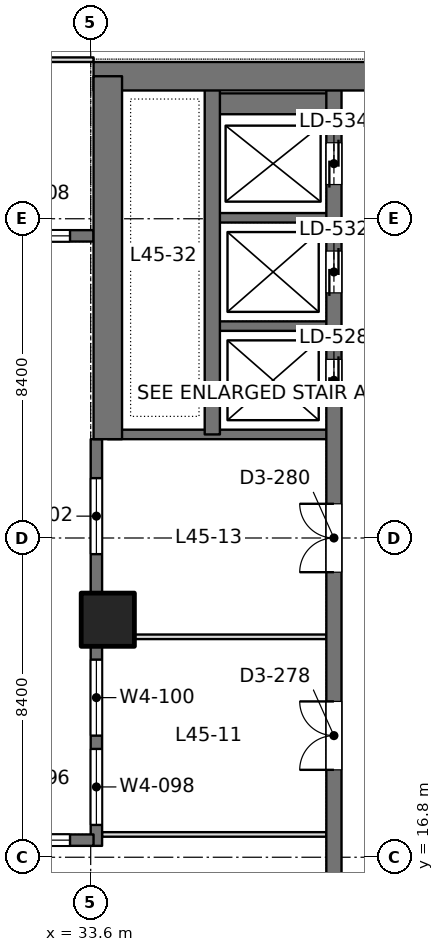
"""IFC4 building model, lengths in metres.
Left out: names, types, materials, properties, quantities, classifications, styles, units other than length and angle.
Written with IfcOpenShell. Run it as: python <this file> out.ifc"""

import sys

from ifc_helpers import new_model, si_unit, direction, frame, frame_2d, origin, origin_2d, place, context, subcontext, project, spatial, rectangle, extrude, element, fill, save


model = new_model("IFC4")
c1 = context("Model", 3, precision=1e-05, world=origin(), true_north=direction((0.0, 1.0)))
c2 = subcontext(c1, "Body", "Model", "MODEL_VIEW")
j1 = project(units=[si_unit("LENGTHUNIT", "METRE"), si_unit("PLANEANGLEUNIT", "RADIAN")], contexts=[c1])
p1 = place(None, origin())
s1 = spatial("IfcSite", under=j1, at=p1, CompositionType="ELEMENT")
p2 = place(p1, origin())
s2 = spatial("IfcBuilding", under=s1, at=p2, CompositionType="ELEMENT")
p3 = place(p2, frame((0.0, 0.0, 198.6)))
s3 = spatial("IfcBuildingStorey", under=s2, at=p3, CompositionType="ELEMENT", Elevation=198.6)
p4 = place(p3, frame((34.05, 23.05, 0.0), z_axis=(0.0, 0.0, 1.0), x_axis=(1.0, 0.0, 0.0)))
e1 = element("IfcColumn", 1, at=p4, inside=s3, PredefinedType="COLUMN", context=c2, shape_type="SweptSolid", body=[
    extrude(rectangle(XDim=1.4, YDim=1.4, at=origin_2d()), origin(), (0.0, 0.0, 1.0), 4.2),
])
p5 = place(p3, frame((33.675, 37.35, 0.0), z_axis=(0.0, 0.0, 1.0), x_axis=(1.0, 0.0, 0.0)))
e2 = element("IfcWall", 2, at=p5, inside=s3, PredefinedType="SHEAR", context=c2, shape_type="SweptSolid", body=[
    extrude(rectangle(XDim=17.85, YDim=0.75, at=frame_2d((8.925, 0.0))), origin(), (0.0, 0.0, 1.0), 4.2),
])
p6 = place(p5, frame((7.175, 0.0, 0.0)))
e3 = element("IfcOpeningElement", 3, at=p6, cuts=e2, PredefinedType="OPENING", context=c2, shape_type="SweptSolid", body=[
    extrude(rectangle(XDim=1.8, YDim=2.4, at=frame_2d((0.9, 1.2))), frame((0.0, 0.385, 0.0), z_axis=(0.0, -1.0, 0.0), x_axis=(1.0, 0.0, 0.0)), (0.0, 0.0, 1.0), 0.77),
])
p7 = place(p3, frame((34.05, 27.8, 0.0), z_axis=(0.0, 0.0, 1.0), x_axis=(0.0, 1.0, 0.0)))
e4 = element("IfcWall", 4, at=p7, inside=s3, PredefinedType="SHEAR", context=c2, shape_type="SweptSolid", body=[
    extrude(rectangle(XDim=9.55, YDim=0.75, at=frame_2d((4.775, 0.0))), origin(), (0.0, 0.0, 1.0), 4.2),
])
p8 = place(p3, frame((40.0, 13.05, 0.0), z_axis=(0.0, 0.0, 1.0), x_axis=(0.0, 1.0, 0.0)))
e5 = element("IfcWall", 5, at=p8, inside=s3, PredefinedType="SHEAR", context=c2, shape_type="SweptSolid", body=[
    extrude(rectangle(XDim=24.3, YDim=0.4, at=frame_2d((12.15, 0.0))), origin(), (0.0, 0.0, 1.0), 4.2),
])
p9 = place(p8, frame((15.75, 0.0, 0.0)))
e6 = element("IfcOpeningElement", 6, at=p9, cuts=e5, PredefinedType="OPENING", context=c2, shape_type="SweptSolid", body=[
    extrude(rectangle(XDim=1.1, YDim=2.2, at=frame_2d((0.55, 1.1))), frame((0.0, 0.21, 0.0), z_axis=(0.0, -1.0, 0.0), x_axis=(1.0, 0.0, 0.0)), (0.0, 0.0, 1.0), 0.42),
])
p10 = place(p8, frame((18.6, 0.0, 0.0)))
e7 = element("IfcOpeningElement", 7, at=p10, cuts=e5, PredefinedType="OPENING", context=c2, shape_type="SweptSolid", body=[
    extrude(rectangle(XDim=1.1, YDim=2.2, at=frame_2d((0.55, 1.1))), frame((0.0, 0.21, 0.0), z_axis=(0.0, -1.0, 0.0), x_axis=(1.0, 0.0, 0.0)), (0.0, 0.0, 1.0), 0.42),
])
p11 = place(p8, frame((21.45, 0.0, 0.0)))
e8 = element("IfcOpeningElement", 8, at=p11, cuts=e5, PredefinedType="OPENING", context=c2, shape_type="SweptSolid", body=[
    extrude(rectangle(XDim=1.1, YDim=2.2, at=frame_2d((0.55, 1.1))), frame((0.0, 0.21, 0.0), z_axis=(0.0, -1.0, 0.0), x_axis=(1.0, 0.0, 0.0)), (0.0, 0.0, 1.0), 0.42),
])
p12 = place(p8, frame((6.05, 0.0, 0.0)))
e9 = element("IfcOpeningElement", 9, at=p12, cuts=e5, PredefinedType="OPENING", context=c2, shape_type="SweptSolid", body=[
    extrude(rectangle(XDim=1.8, YDim=2.4, at=frame_2d((0.9, 1.2))), frame((0.0, 0.21, 0.0), z_axis=(0.0, -1.0, 0.0), x_axis=(1.0, 0.0, 0.0)), (0.0, 0.0, 1.0), 0.42),
])
p13 = place(p8, frame((11.25, 0.0, 0.0)))
e10 = element("IfcOpeningElement", 10, at=p13, cuts=e5, PredefinedType="OPENING", context=c2, shape_type="SweptSolid", body=[
    extrude(rectangle(XDim=1.8, YDim=2.4, at=frame_2d((0.9, 1.2))), frame((0.0, 0.21, 0.0), z_axis=(0.0, -1.0, 0.0), x_axis=(1.0, 0.0, 0.0)), (0.0, 0.0, 1.0), 0.42),
])
p14 = place(p3, frame((36.8, 27.925, 0.0), z_axis=(0.0, 0.0, 1.0), x_axis=(0.0, 1.0, 0.0)))
e11 = element("IfcWall", 11, at=p14, inside=s3, PredefinedType="SHEAR", context=c2, shape_type="SweptSolid", body=[
    extrude(rectangle(XDim=9.425, YDim=0.4, at=frame_2d((4.712, 0.0))), origin(), (0.0, 0.0, 1.0), 4.2),
])
p15 = place(p3, frame((40.0, 27.925, 0.0), z_axis=(0.0, 0.0, 1.0), x_axis=(-1.0, 0.0, 0.0)))
e12 = element("IfcWall", 12, at=p15, inside=s3, PredefinedType="SHEAR", context=c2, shape_type="SweptSolid", body=[
    extrude(rectangle(XDim=5.95, YDim=0.25, at=frame_2d((2.975, 0.0))), origin(), (0.0, 0.0, 1.0), 4.2),
])
for number, where, z_axis, x_axis in (
    (13, (40.0, 30.775, 0.0), (0.0, 0.0, 1.0), (-1.0, 0.0, 0.0)),
    (14, (40.0, 33.625, 0.0), (0.0, 0.0, 1.0), (-1.0, 0.0, 0.0)),
):
    element("IfcWall", number, at=place(p3, frame(where, z_axis=z_axis, x_axis=x_axis)), inside=s3, PredefinedType="SHEAR", context=c2, shape_type="SweptSolid", body=[
        extrude(rectangle(XDim=3.2, YDim=0.25, at=frame_2d((1.6, 0.0))), origin(), (0.0, 0.0, 1.0), 4.2),
    ])
p16 = place(p3, frame((40.0, 36.625, 0.0), z_axis=(0.0, 0.0, 1.0), x_axis=(-1.0, 0.0, 0.0)))
e15 = element("IfcWall", 15, at=p16, inside=s3, PredefinedType="SHEAR", context=c2, shape_type="SweptSolid", body=[
    extrude(rectangle(XDim=3.2, YDim=0.55, at=frame_2d((1.6, 0.0))), origin(), (0.0, 0.0, 1.0), 4.2),
])
p17 = place(p3, frame((33.75, 17.1, 0.0), z_axis=(0.0, 0.0, 1.0), x_axis=(0.0, 1.0, 0.0)))
e16 = element("IfcWall", 16, at=p17, inside=s3, PredefinedType="SOLIDWALL", context=c2, shape_type="SweptSolid", body=[
    extrude(rectangle(XDim=10.7, YDim=0.3, at=frame_2d((5.35, 0.0))), origin(), (0.0, 0.0, 1.0), 4.05),
])
p18 = place(p17, frame((0.55, 0.0, 0.9)))
e17 = element("IfcOpeningElement", 17, at=p18, cuts=e16, PredefinedType="OPENING", context=c2, shape_type="SweptSolid", body=[
    extrude(rectangle(XDim=2.0, YDim=1.9, at=frame_2d((1.0, 0.95))), frame((0.0, 0.16, 0.0), z_axis=(0.0, -1.0, 0.0), x_axis=(1.0, 0.0, 0.0)), (0.0, 0.0, 1.0), 0.32),
])
p19 = place(p17, frame((2.9, 0.0, 0.9)))
e18 = element("IfcOpeningElement", 18, at=p19, cuts=e16, PredefinedType="OPENING", context=c2, shape_type="SweptSolid", body=[
    extrude(rectangle(XDim=2.0, YDim=1.9, at=frame_2d((1.0, 0.95))), frame((0.0, 0.16, 0.0), z_axis=(0.0, -1.0, 0.0), x_axis=(1.0, 0.0, 0.0)), (0.0, 0.0, 1.0), 0.32),
])
p20 = place(p17, frame((7.675, 0.0, 0.9)))
e19 = element("IfcOpeningElement", 19, at=p20, cuts=e16, PredefinedType="OPENING", context=c2, shape_type="SweptSolid", body=[
    extrude(rectangle(XDim=2.0, YDim=1.9, at=frame_2d((1.0, 0.95))), frame((0.0, 0.16, 0.0), z_axis=(0.0, -1.0, 0.0), x_axis=(1.0, 0.0, 0.0)), (0.0, 0.0, 1.0), 0.32),
])
p21 = place(p3, frame((25.75, 17.25, 0.0), z_axis=(0.0, 0.0, 1.0), x_axis=(1.0, 0.0, 0.0)))
e20 = element("IfcWall", 20, at=p21, inside=s3, PredefinedType="SOLIDWALL", context=c2, shape_type="SweptSolid", body=[
    extrude(rectangle(XDim=7.925, YDim=0.3, at=frame_2d((3.962, 0.0))), origin(), (0.0, 0.0, 1.0), 4.05),
])
p22 = place(p21, frame((0.069, 0.0, 0.9)))
e21 = element("IfcOpeningElement", 21, at=p22, cuts=e20, PredefinedType="OPENING", context=c2, shape_type="SweptSolid", body=[
    extrude(rectangle(XDim=2.0, YDim=1.9, at=frame_2d((1.0, 0.95))), frame((0.0, 0.16, 0.0), z_axis=(0.0, -1.0, 0.0), x_axis=(1.0, 0.0, 0.0)), (0.0, 0.0, 1.0), 0.32),
])
p23 = place(p21, frame((2.688, 0.0, 0.9)))
e22 = element("IfcOpeningElement", 22, at=p23, cuts=e20, PredefinedType="OPENING", context=c2, shape_type="SweptSolid", body=[
    extrude(rectangle(XDim=2.0, YDim=1.9, at=frame_2d((1.0, 0.95))), frame((0.0, 0.16, 0.0), z_axis=(0.0, -1.0, 0.0), x_axis=(1.0, 0.0, 0.0)), (0.0, 0.0, 1.0), 0.32),
])
p24 = place(p21, frame((5.306, 0.0, 0.9)))
e23 = element("IfcOpeningElement", 23, at=p24, cuts=e20, PredefinedType="OPENING", context=c2, shape_type="SweptSolid", body=[
    extrude(rectangle(XDim=2.0, YDim=1.9, at=frame_2d((1.0, 0.95))), frame((0.0, 0.16, 0.0), z_axis=(0.0, -1.0, 0.0), x_axis=(1.0, 0.0, 0.0)), (0.0, 0.0, 1.0), 0.32),
])
p25 = place(p3, frame((25.75, 33.15, 0.0), z_axis=(0.0, 0.0, 1.0), x_axis=(1.0, 0.0, 0.0)))
e24 = element("IfcWall", 24, at=p25, inside=s3, PredefinedType="SOLIDWALL", context=c2, shape_type="SweptSolid", body=[
    extrude(rectangle(XDim=7.925, YDim=0.3, at=frame_2d((3.962, 0.0))), origin(), (0.0, 0.0, 1.0), 4.05),
])
p26 = place(p25, frame((0.069, 0.0, 0.9)))
e25 = element("IfcOpeningElement", 25, at=p26, cuts=e24, PredefinedType="OPENING", context=c2, shape_type="SweptSolid", body=[
    extrude(rectangle(XDim=2.0, YDim=1.9, at=frame_2d((1.0, 0.95))), frame((0.0, 0.16, 0.0), z_axis=(0.0, -1.0, 0.0), x_axis=(1.0, 0.0, 0.0)), (0.0, 0.0, 1.0), 0.32),
])
p27 = place(p25, frame((2.688, 0.0, 0.9)))
e26 = element("IfcOpeningElement", 26, at=p27, cuts=e24, PredefinedType="OPENING", context=c2, shape_type="SweptSolid", body=[
    extrude(rectangle(XDim=2.0, YDim=1.9, at=frame_2d((1.0, 0.95))), frame((0.0, 0.16, 0.0), z_axis=(0.0, -1.0, 0.0), x_axis=(1.0, 0.0, 0.0)), (0.0, 0.0, 1.0), 0.32),
])
p28 = place(p25, frame((5.306, 0.0, 0.9)))
e27 = element("IfcOpeningElement", 27, at=p28, cuts=e24, PredefinedType="OPENING", context=c2, shape_type="SweptSolid", body=[
    extrude(rectangle(XDim=2.0, YDim=1.9, at=frame_2d((1.0, 0.95))), frame((0.0, 0.16, 0.0), z_axis=(0.0, -1.0, 0.0), x_axis=(1.0, 0.0, 0.0)), (0.0, 0.0, 1.0), 0.32),
])
p29 = place(p3, frame((33.898, 17.4, 0.0), z_axis=(0.0, 0.0, 1.0), x_axis=(1.0, 0.0, 0.0)))
e28 = element("IfcWall", 28, at=p29, inside=s3, PredefinedType="PARTITIONING", context=c2, shape_type="SweptSolid", body=[
    extrude(rectangle(XDim=5.904, YDim=0.12, at=frame_2d((2.952, 0.0))), origin(), (0.0, 0.0, 1.0), 3.55),
])
p30 = place(p3, frame((34.749, 22.6, 0.0), z_axis=(0.0, 0.0, 1.0), x_axis=(1.0, 0.0, 0.0)))
e29 = element("IfcWall", 29, at=p30, inside=s3, PredefinedType="PARTITIONING", context=c2, shape_type="SweptSolid", body=[
    extrude(rectangle(XDim=5.053, YDim=0.12, at=frame_2d((2.526, 0.0))), origin(), (0.0, 0.0, 1.0), 4.05),
])
p31 = place(p3, frame((16.725, 37.785, 0.0), z_axis=(0.0, 0.0, 1.0), x_axis=(1.0, 0.0, 0.0)))
e30 = element("IfcWall", 30, at=p31, inside=s3, PredefinedType="PARTITIONING", context=c2, shape_type="SweptSolid", body=[
    extrude(rectangle(XDim=16.95, YDim=0.12, at=frame_2d((8.475, 0.0))), origin(), (0.0, 0.0, 1.0), 3.55),
])
p32 = place(p31, frame((7.575, 0.0, 0.0)))
e31 = element("IfcOpeningElement", 31, at=p32, cuts=e30, PredefinedType="OPENING", context=c2, shape_type="SweptSolid", body=[
    extrude(rectangle(XDim=1.8, YDim=2.2, at=frame_2d((0.9, 1.1))), frame((0.0, 0.07, 0.0), z_axis=(0.0, -1.0, 0.0), x_axis=(1.0, 0.0, 0.0)), (0.0, 0.0, 1.0), 0.14),
])
p33 = place(p18, origin())
e32 = element("IfcWindow", 32, at=p33, inside=s3, PartitioningType="SINGLE_PANEL", PredefinedType="WINDOW", context=c2, shape_type="SweptSolid", body=[
    extrude(rectangle(XDim=2.0, YDim=1.9, at=frame_2d((1.0, 0.95))), frame((0.0, 0.03, 0.0), z_axis=(0.0, -1.0, 0.0), x_axis=(1.0, 0.0, 0.0)), (0.0, 0.0, 1.0), 0.06),
])
fill(e17, e32)
p34 = place(p19, origin())
e33 = element("IfcWindow", 33, at=p34, inside=s3, PartitioningType="SINGLE_PANEL", PredefinedType="WINDOW", context=c2, shape_type="SweptSolid", body=[
    extrude(rectangle(XDim=2.0, YDim=1.9, at=frame_2d((1.0, 0.95))), frame((0.0, 0.03, 0.0), z_axis=(0.0, -1.0, 0.0), x_axis=(1.0, 0.0, 0.0)), (0.0, 0.0, 1.0), 0.06),
])
fill(e18, e33)
p35 = place(p20, origin())
e34 = element("IfcWindow", 34, at=p35, inside=s3, PartitioningType="SINGLE_PANEL", PredefinedType="WINDOW", context=c2, shape_type="SweptSolid", body=[
    extrude(rectangle(XDim=2.0, YDim=1.9, at=frame_2d((1.0, 0.95))), frame((0.0, 0.03, 0.0), z_axis=(0.0, -1.0, 0.0), x_axis=(1.0, 0.0, 0.0)), (0.0, 0.0, 1.0), 0.06),
])
fill(e19, e34)
p36 = place(p24, origin())
e35 = element("IfcWindow", 35, at=p36, inside=s3, PartitioningType="SINGLE_PANEL", PredefinedType="WINDOW", context=c2, shape_type="SweptSolid", body=[
    extrude(rectangle(XDim=2.0, YDim=1.9, at=frame_2d((1.0, 0.95))), frame((0.0, 0.03, 0.0), z_axis=(0.0, -1.0, 0.0), x_axis=(1.0, 0.0, 0.0)), (0.0, 0.0, 1.0), 0.06),
])
fill(e23, e35)
p37 = place(p28, origin())
e36 = element("IfcWindow", 36, at=p37, inside=s3, PartitioningType="SINGLE_PANEL", PredefinedType="WINDOW", context=c2, shape_type="SweptSolid", body=[
    extrude(rectangle(XDim=2.0, YDim=1.9, at=frame_2d((1.0, 0.95))), frame((0.0, 0.03, 0.0), z_axis=(0.0, -1.0, 0.0), x_axis=(1.0, 0.0, 0.0)), (0.0, 0.0, 1.0), 0.06),
])
fill(e27, e36)
p38 = place(p9, origin())
e37 = element("IfcDoor", 37, at=p38, inside=s3, OperationType="DOUBLE_DOOR_SLIDING", PredefinedType="DOOR", context=c2, shape_type="SweptSolid", body=[
    extrude(rectangle(XDim=1.1, YDim=2.2, at=frame_2d((0.55, 1.1))), frame((0.0, 0.025, 0.0), z_axis=(0.0, -1.0, 0.0), x_axis=(1.0, 0.0, 0.0)), (0.0, 0.0, 1.0), 0.05),
])
fill(e6, e37)
p39 = place(p10, origin())
e38 = element("IfcDoor", 38, at=p39, inside=s3, OperationType="DOUBLE_DOOR_SLIDING", PredefinedType="DOOR", context=c2, shape_type="SweptSolid", body=[
    extrude(rectangle(XDim=1.1, YDim=2.2, at=frame_2d((0.55, 1.1))), frame((0.0, 0.025, 0.0), z_axis=(0.0, -1.0, 0.0), x_axis=(1.0, 0.0, 0.0)), (0.0, 0.0, 1.0), 0.05),
])
fill(e7, e38)
p40 = place(p11, origin())
e39 = element("IfcDoor", 39, at=p40, inside=s3, OperationType="DOUBLE_DOOR_SLIDING", PredefinedType="DOOR", context=c2, shape_type="SweptSolid", body=[
    extrude(rectangle(XDim=1.1, YDim=2.2, at=frame_2d((0.55, 1.1))), frame((0.0, 0.025, 0.0), z_axis=(0.0, -1.0, 0.0), x_axis=(1.0, 0.0, 0.0)), (0.0, 0.0, 1.0), 0.05),
])
fill(e8, e39)
p41 = place(p12, origin())
e40 = element("IfcDoor", 40, at=p41, inside=s3, OperationType="DOUBLE_DOOR_SINGLE_SWING", PredefinedType="DOOR", context=c2, shape_type="SweptSolid", body=[
    extrude(rectangle(XDim=1.8, YDim=2.4, at=frame_2d((0.9, 1.2))), frame((0.0, 0.025, 0.0), z_axis=(0.0, -1.0, 0.0), x_axis=(1.0, 0.0, 0.0)), (0.0, 0.0, 1.0), 0.05),
])
fill(e9, e40)
p42 = place(p13, origin())
e41 = element("IfcDoor", 41, at=p42, inside=s3, OperationType="DOUBLE_DOOR_SINGLE_SWING", PredefinedType="DOOR", context=c2, shape_type="SweptSolid", body=[
    extrude(rectangle(XDim=1.8, YDim=2.4, at=frame_2d((0.9, 1.2))), frame((0.0, 0.025, 0.0), z_axis=(0.0, -1.0, 0.0), x_axis=(1.0, 0.0, 0.0)), (0.0, 0.0, 1.0), 0.05),
])
fill(e10, e41)
save(model, sys.argv[1])
